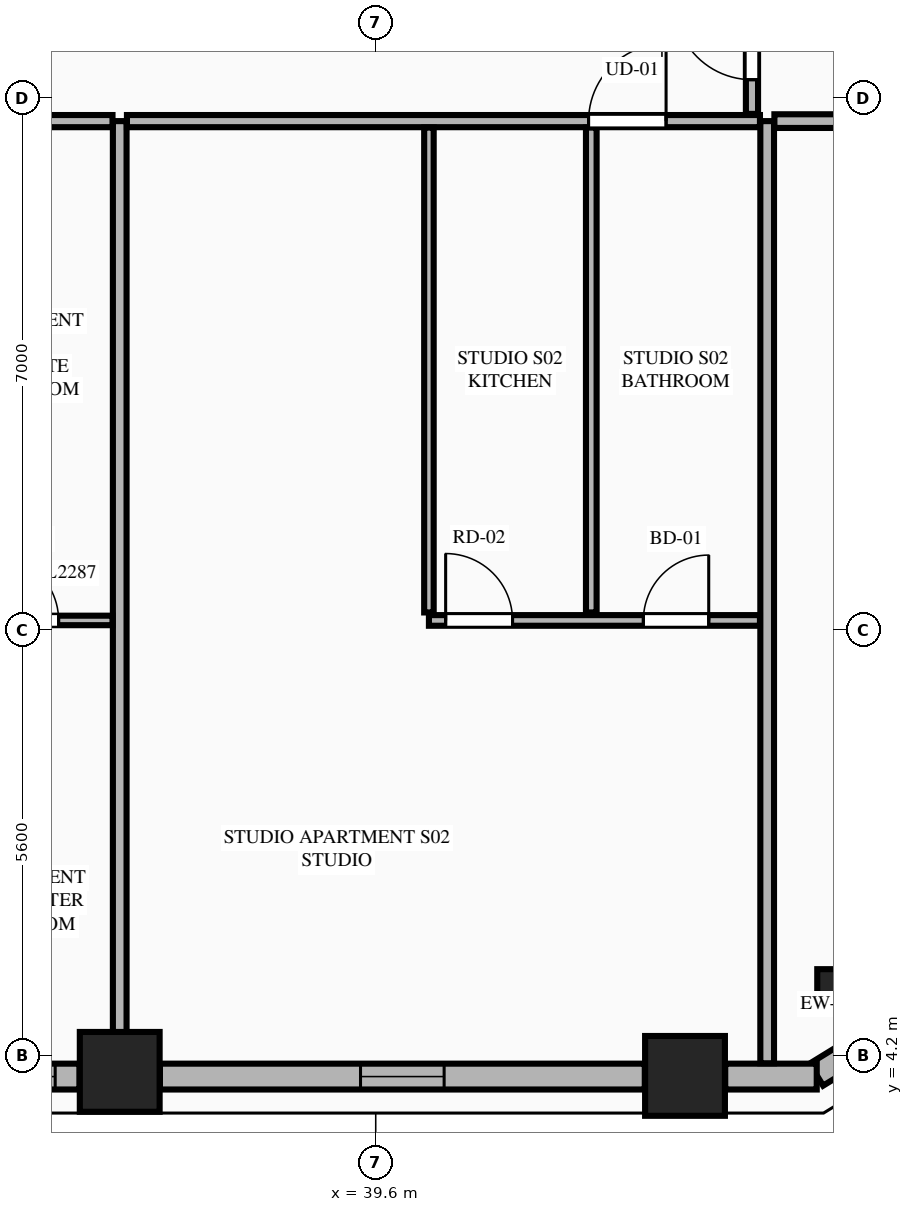
"""IFC4 building model, lengths in metres.
Left out: names, types, materials, properties, quantities, classifications, styles, units other than length and angle.
Written with IfcOpenShell. Run it as: python <this file> out.ifc"""

import sys

from ifc_helpers import new_model, si_unit, direction, frame, frame_2d, origin, origin_2d, place, context, subcontext, project, spatial, rectangle, extrude, element, fill, save


model = new_model("IFC4")
c1 = context("Model", 3, precision=1e-05, world=origin(), true_north=direction((0.0, 1.0)))
c2 = subcontext(c1, "Body", "Model", "MODEL_VIEW")
j1 = project(units=[si_unit("LENGTHUNIT", "METRE"), si_unit("PLANEANGLEUNIT", "RADIAN")], contexts=[c1])
p1 = place(None, origin())
s1 = spatial("IfcSite", under=j1, at=p1, CompositionType="ELEMENT")
p2 = place(p1, origin())
s2 = spatial("IfcBuilding", under=s1, at=p2, CompositionType="ELEMENT")
p3 = place(p2, frame((0.0, 0.0, 105.5)))
s3 = spatial("IfcBuildingStorey", under=s2, at=p3, CompositionType="ELEMENT", Elevation=105.5)
for number, where, z_axis, x_axis in (
    (1, (36.232, 3.992, 0.0), (0.0, 0.0, 1.0), (1.0, 0.0, 0.0)),
    (2, (43.669, 3.939, 0.0), (0.0, 0.0, 1.0), (1.0, 0.0, 0.0)),
):
    element("IfcColumn", number, at=place(p3, frame(where, z_axis=z_axis, x_axis=x_axis)), inside=s3, PredefinedType="COLUMN", context=c2, shape_type="SweptSolid", body=[
        extrude(rectangle(XDim=1.05, YDim=1.05, at=origin_2d()), origin(), (0.0, 0.0, 1.0), 3.55),
    ])
p4 = place(p3, frame((45.659, 5.093, 0.0), z_axis=(0.0, 0.0, 1.0), x_axis=(0.865160173452, 0.501495637342, 0.0)))
e3 = element("IfcColumn", 3, at=p4, inside=s3, PredefinedType="PILASTER", context=c2, shape_type="SweptSolid", body=[
    extrude(rectangle(XDim=0.5, YDim=0.35, at=origin_2d()), origin(), (0.0, 0.0, 1.0), 3.55),
])
p5 = place(p3, frame((45.397, 3.955, 0.0), z_axis=(0.0, 0.0, 1.0), x_axis=(0.851798915137, 0.523868884523, 0.0)))
e4 = element("IfcWall", 4, at=p5, inside=s3, PredefinedType="STANDARD", context=c2, shape_type="SweptSolid", body=[
    extrude(rectangle(XDim=1.848, YDim=0.34, at=frame_2d((0.924, 0.0))), origin(), (0.0, 0.0, 1.0), 3.34),
])
p6 = place(p3, frame((29.097, 3.93, 0.0), z_axis=(0.0, 0.0, 1.0), x_axis=(1.0, 0.0, 0.0)))
e5 = element("IfcWall", 5, at=p6, inside=s3, PredefinedType="STANDARD", context=c2, shape_type="SweptSolid", body=[
    extrude(rectangle(XDim=6.606, YDim=0.34, at=frame_2d((3.303, 0.0))), origin(), (0.0, 0.0, 1.0), 2.797),
])
p7 = place(p6, frame((1.77, 0.0, 0.75)))
e6 = element("IfcOpeningElement", 6, at=p7, cuts=e5, PredefinedType="OPENING", context=c2, shape_type="SweptSolid", body=[
    extrude(rectangle(XDim=1.1, YDim=1.897, at=frame_2d((0.55, 0.948))), frame((0.0, 0.18, 0.0), z_axis=(0.0, -1.0, 0.0), x_axis=(1.0, 0.0, 0.0)), (0.0, 0.0, 1.0), 0.36),
])
p8 = place(p6, frame((5.186, 0.0, 0.75)))
e7 = element("IfcOpeningElement", 7, at=p8, cuts=e5, PredefinedType="OPENING", context=c2, shape_type="SweptSolid", body=[
    extrude(rectangle(XDim=1.1, YDim=1.897, at=frame_2d((0.55, 0.948))), frame((0.0, 0.18, 0.0), z_axis=(0.0, -1.0, 0.0), x_axis=(1.0, 0.0, 0.0)), (0.0, 0.0, 1.0), 0.36),
])
p9 = place(p3, frame((36.761, 3.93, 0.0), z_axis=(0.0, 0.0, 1.0), x_axis=(1.0, 0.0, 0.0)))
e8 = element("IfcWall", 8, at=p9, inside=s3, PredefinedType="STANDARD", context=c2, shape_type="SweptSolid", body=[
    extrude(rectangle(XDim=6.379, YDim=0.34, at=frame_2d((3.189, 0.0))), origin(), (0.0, 0.0, 1.0), 2.797),
])
p10 = place(p9, frame((2.639, 0.0, 0.75)))
e9 = element("IfcOpeningElement", 9, at=p10, cuts=e8, PredefinedType="OPENING", context=c2, shape_type="SweptSolid", body=[
    extrude(rectangle(XDim=1.1, YDim=1.897, at=frame_2d((0.55, 0.948))), frame((0.0, 0.18, 0.0), z_axis=(0.0, -1.0, 0.0), x_axis=(1.0, 0.0, 0.0)), (0.0, 0.0, 1.0), 0.36),
])
p11 = place(p3, frame((44.198, 3.93, 0.0), z_axis=(0.0, 0.0, 1.0), x_axis=(1.0, 0.0, 0.0)))
e10 = element("IfcWall", 10, at=p11, inside=s3, PredefinedType="STANDARD", context=c2, shape_type="SweptSolid", body=[
    extrude(rectangle(XDim=1.204, YDim=0.34, at=frame_2d((0.602, 0.0))), origin(), (0.0, 0.0, 1.0), 3.34),
])
p12 = place(p3, frame((36.232, 4.105, 0.0), z_axis=(0.0, 0.0, 1.0), x_axis=(0.0, 1.0, 0.0)))
e11 = element("IfcWall", 11, at=p12, inside=s3, PredefinedType="PARTITIONING", context=c2, shape_type="SweptSolid", body=[
    extrude(rectangle(XDim=12.395, YDim=0.18, at=frame_2d((6.198, 0.0))), origin(), (0.0, 0.0, 1.0), 2.722),
])
p13 = place(p3, frame((44.75, 4.105, 0.0), z_axis=(0.0, 0.0, 1.0), x_axis=(0.0, 1.0, 0.0)))
e12 = element("IfcWall", 12, at=p13, inside=s3, PredefinedType="PARTITIONING", context=c2, shape_type="SweptSolid", body=[
    extrude(rectangle(XDim=12.395, YDim=0.18, at=frame_2d((6.198, 0.0))), origin(), (0.0, 0.0, 1.0), 3.34),
])
p14 = place(p3, frame((20.145, 16.5, 0.0), z_axis=(0.0, 0.0, 1.0), x_axis=(1.0, 0.0, 0.0)))
e13 = element("IfcWall", 13, at=p14, inside=s3, PredefinedType="PARTITIONING", context=c2, shape_type="SweptSolid", body=[
    extrude(rectangle(XDim=15.992, YDim=0.16, at=frame_2d((7.996, 0.0))), origin(), (0.0, 0.0, 1.0), 3.34),
])
p15 = place(p14, frame((0.405, 0.0, 0.0)))
e14 = element("IfcOpeningElement", 14, at=p15, cuts=e13, PredefinedType="OPENING", context=c2, shape_type="SweptSolid", body=[
    extrude(rectangle(XDim=1.35, YDim=2.35, at=frame_2d((0.675, 1.175))), frame((0.0, 0.09, 0.0), z_axis=(0.0, -1.0, 0.0), x_axis=(1.0, 0.0, 0.0)), (0.0, 0.0, 1.0), 0.18),
])
p16 = place(p3, frame((33.85, 9.931, 0.0), z_axis=(0.0, 0.0, 1.0), x_axis=(1.0, 0.0, 0.0)))
e15 = element("IfcWall", 15, at=p16, inside=s3, PredefinedType="PARTITIONING", context=c2, shape_type="SweptSolid", body=[
    extrude(rectangle(XDim=2.287, YDim=0.125, at=frame_2d((1.144, 0.0))), origin(), (0.0, 0.0, 1.0), 3.34),
])
p17 = place(p16, frame((0.718, 0.0, 0.0)))
e16 = element("IfcOpeningElement", 16, at=p17, cuts=e15, PredefinedType="OPENING", context=c2, shape_type="SweptSolid", body=[
    extrude(rectangle(XDim=0.86, YDim=2.1, at=frame_2d((0.43, 1.05))), frame((0.0, 0.073, 0.0), z_axis=(0.0, -1.0, 0.0), x_axis=(1.0, 0.0, 0.0)), (0.0, 0.0, 1.0), 0.145),
])
p18 = place(p3, frame((36.327, 16.5, 0.0), z_axis=(0.0, 0.0, 1.0), x_axis=(1.0, 0.0, 0.0)))
e17 = element("IfcWall", 17, at=p18, inside=s3, PredefinedType="PARTITIONING", context=c2, shape_type="SweptSolid", body=[
    extrude(rectangle(XDim=8.328, YDim=0.16, at=frame_2d((4.164, 0.0))), origin(), (0.0, 0.0, 1.0), 3.34),
])
p19 = place(p18, frame((6.073, 0.0, 0.0)))
e18 = element("IfcOpeningElement", 18, at=p19, cuts=e17, PredefinedType="OPENING", context=c2, shape_type="SweptSolid", body=[
    extrude(rectangle(XDim=1.02, YDim=2.25, at=frame_2d((0.51, 1.125))), frame((0.0, 0.09, 0.0), z_axis=(0.0, -1.0, 0.0), x_axis=(1.0, 0.0, 0.0)), (0.0, 0.0, 1.0), 0.18),
])
p20 = place(p3, frame((40.3, 10.036, 0.0), z_axis=(0.0, 0.0, 1.0), x_axis=(0.0, 1.0, 0.0)))
e19 = element("IfcWall", 19, at=p20, inside=s3, PredefinedType="PARTITIONING", context=c2, shape_type="SweptSolid", body=[
    extrude(rectangle(XDim=6.379, YDim=0.125, at=frame_2d((3.189, 0.0))), origin(), (0.0, 0.0, 1.0), 3.34),
])
p21 = place(p3, frame((40.3, 9.931, 0.0), z_axis=(0.0, 0.0, 1.0), x_axis=(1.0, 0.0, 0.0)))
e20 = element("IfcWall", 20, at=p21, inside=s3, PredefinedType="PLUMBINGWALL", context=c2, shape_type="SweptSolid", body=[
    extrude(rectangle(XDim=4.355, YDim=0.14, at=frame_2d((2.177, 0.0))), origin(), (0.0, 0.0, 1.0), 3.34),
])
p22 = place(p21, frame((2.821, 0.0, 0.0)))
e21 = element("IfcOpeningElement", 21, at=p22, cuts=e20, PredefinedType="OPENING", context=c2, shape_type="SweptSolid", body=[
    extrude(rectangle(XDim=0.86, YDim=2.1, at=frame_2d((0.43, 1.05))), frame((0.0, 0.08, 0.0), z_axis=(0.0, -1.0, 0.0), x_axis=(1.0, 0.0, 0.0)), (0.0, 0.0, 1.0), 0.16),
])
p23 = place(p21, frame((0.22, 0.0, 0.0)))
e22 = element("IfcOpeningElement", 22, at=p23, cuts=e20, PredefinedType="OPENING", context=c2, shape_type="SweptSolid", body=[
    extrude(rectangle(XDim=0.88, YDim=2.15, at=frame_2d((0.44, 1.075))), frame((0.0, 0.08, 0.0), z_axis=(0.0, -1.0, 0.0), x_axis=(1.0, 0.0, 0.0)), (0.0, 0.0, 1.0), 0.16),
])
p24 = place(p3, frame((42.436, 10.036, 0.0), z_axis=(0.0, 0.0, 1.0), x_axis=(0.0, 1.0, 0.0)))
e23 = element("IfcWall", 23, at=p24, inside=s3, PredefinedType="PLUMBINGWALL", context=c2, shape_type="SweptSolid", body=[
    extrude(rectangle(XDim=6.379, YDim=0.14, at=frame_2d((3.189, 0.0))), origin(), (0.0, 0.0, 1.0), 2.722),
])
p25 = place(p3, frame((44.845, 16.5, 0.0), z_axis=(0.0, 0.0, 1.0), x_axis=(1.0, 0.0, 0.0)))
e24 = element("IfcWall", 24, at=p25, inside=s3, PredefinedType="PARTITIONING", context=c2, shape_type="SweptSolid", body=[
    extrude(rectangle(XDim=7.77, YDim=0.18, at=frame_2d((3.885, 0.0))), origin(), (0.0, 0.0, 1.0), 3.34),
])
p26 = place(p3, frame((44.55, 16.595, 0.0), z_axis=(0.0, 0.0, 1.0), x_axis=(0.0, 1.0, 0.0)))
e25 = element("IfcWall", 25, at=p26, inside=s3, PredefinedType="PARTITIONING", context=c2, shape_type="SweptSolid", body=[
    extrude(rectangle(XDim=9.586, YDim=0.16, at=frame_2d((4.793, 0.0))), origin(), (0.0, 0.0, 1.0), 3.34),
])
p27 = place(p26, frame((0.45, 0.0, 0.0)))
e26 = element("IfcOpeningElement", 26, at=p27, cuts=e25, PredefinedType="OPENING", context=c2, shape_type="SweptSolid", body=[
    extrude(rectangle(XDim=1.02, YDim=2.25, at=frame_2d((0.51, 1.125))), frame((0.0, 0.09, 0.0), z_axis=(0.0, -1.0, 0.0), x_axis=(1.0, 0.0, 0.0)), (0.0, 0.0, 1.0), 0.18),
])
p28 = place(p10, origin())
e27 = element("IfcWindow", 27, at=p28, inside=s3, PartitioningType="SINGLE_PANEL", PredefinedType="WINDOW", context=c2, shape_type="SweptSolid", body=[
    extrude(rectangle(XDim=1.1, YDim=1.897, at=frame_2d((0.55, 0.948))), frame((0.0, 0.03, 0.0), z_axis=(0.0, -1.0, 0.0), x_axis=(1.0, 0.0, 0.0)), (0.0, 0.0, 1.0), 0.06),
])
fill(e9, e27)
p29 = place(p17, origin())
e28 = element("IfcDoor", 28, at=p29, inside=s3, OperationType="SINGLE_SWING_LEFT", PredefinedType="DOOR", context=c2, shape_type="SweptSolid", body=[
    extrude(rectangle(XDim=0.86, YDim=2.1, at=frame_2d((0.43, 1.05))), frame((0.0, 0.025, 0.0), z_axis=(0.0, -1.0, 0.0), x_axis=(1.0, 0.0, 0.0)), (0.0, 0.0, 1.0), 0.05),
])
fill(e16, e28)
p30 = place(p22, origin())
e29 = element("IfcDoor", 29, at=p30, inside=s3, OperationType="SINGLE_SWING_RIGHT", PredefinedType="DOOR", context=c2, shape_type="SweptSolid", body=[
    extrude(rectangle(XDim=0.86, YDim=2.1, at=frame_2d((0.43, 1.05))), frame((0.0, 0.025, 0.0), z_axis=(0.0, -1.0, 0.0), x_axis=(1.0, 0.0, 0.0)), (0.0, 0.0, 1.0), 0.05),
])
fill(e21, e29)
p31 = place(p19, origin())
e30 = element("IfcDoor", 30, at=p31, inside=s3, OperationType="SINGLE_SWING_RIGHT", PredefinedType="DOOR", context=c2, shape_type="SweptSolid", body=[
    extrude(rectangle(XDim=1.02, YDim=2.25, at=frame_2d((0.51, 1.125))), frame((0.0, 0.025, 0.0), z_axis=(0.0, -1.0, 0.0), x_axis=(1.0, 0.0, 0.0)), (0.0, 0.0, 1.0), 0.05),
])
fill(e18, e30)
p32 = place(p23, origin())
e31 = element("IfcDoor", 31, at=p32, inside=s3, OperationType="SINGLE_SWING_LEFT", PredefinedType="DOOR", context=c2, shape_type="SweptSolid", body=[
    extrude(rectangle(XDim=0.88, YDim=2.15, at=frame_2d((0.44, 1.075))), frame((0.0, 0.025, 0.0), z_axis=(0.0, -1.0, 0.0), x_axis=(1.0, 0.0, 0.0)), (0.0, 0.0, 1.0), 0.05),
])
fill(e22, e31)
p33 = place(p27, origin())
e32 = element("IfcDoor", 32, at=p33, inside=s3, OperationType="SINGLE_SWING_RIGHT", PredefinedType="DOOR", context=c2, shape_type="SweptSolid", body=[
    extrude(rectangle(XDim=1.02, YDim=2.25, at=frame_2d((0.51, 1.125))), frame((0.0, 0.025, 0.0), z_axis=(0.0, -1.0, 0.0), x_axis=(1.0, 0.0, 0.0)), (0.0, 0.0, 1.0), 0.05),
])
fill(e26, e32)
p34 = place(p8, origin())
e33 = element("IfcWindow", 33, at=p34, inside=s3, PartitioningType="SINGLE_PANEL", PredefinedType="WINDOW", context=c2, shape_type="SweptSolid", body=[
    extrude(rectangle(XDim=1.1, YDim=1.897, at=frame_2d((0.55, 0.948))), frame((0.0, 0.03, 0.0), z_axis=(0.0, -1.0, 0.0), x_axis=(1.0, 0.0, 0.0)), (0.0, 0.0, 1.0), 0.06),
])
fill(e7, e33)
save(model, sys.argv[1])
